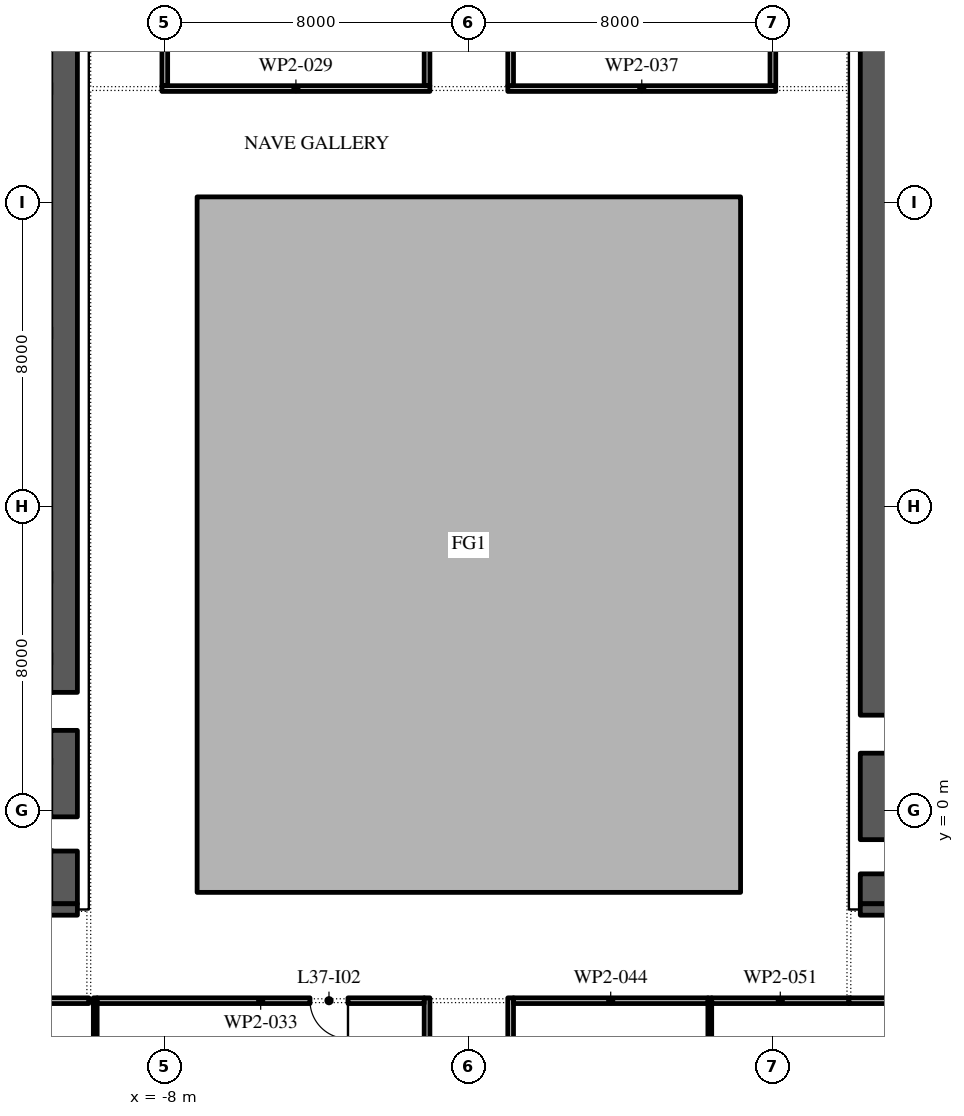
"""IFC4 building model, lengths in metres.
Left out: names, types, materials, properties, quantities, classifications, styles, units other than length and angle.
Written with IfcOpenShell. Run it as: python <this file> out.ifc"""

import sys

from ifc_helpers import new_model, si_unit, direction, frame, frame_2d, origin, place, context, subcontext, project, spatial, polyline, rectangle, outline, extrude, element, fill, save


model = new_model("IFC4")
c1 = context("Model", 3, precision=1e-05, world=origin(), true_north=direction((0.0, 1.0)))
c2 = subcontext(c1, "Body", "Model", "MODEL_VIEW")
j1 = project(units=[si_unit("LENGTHUNIT", "METRE"), si_unit("PLANEANGLEUNIT", "RADIAN")], contexts=[c1])
p1 = place(None, origin())
s1 = spatial("IfcSite", under=j1, at=p1, CompositionType="ELEMENT")
p2 = place(p1, origin())
s2 = spatial("IfcBuilding", under=s1, at=p2, CompositionType="ELEMENT")
p3 = place(p2, frame((0.0, 0.0, 171.6)))
s3 = spatial("IfcBuildingStorey", under=s2, at=p3, CompositionType="ELEMENT", Elevation=171.6)
p4 = place(p3, origin())
e1 = element("IfcWall", 1, at=p4, inside=s3, PredefinedType="STANDARD", context=c2, shape_type="SweptSolid", body=[
    extrude(outline(polyline([(-7.15, -2.15), (7.15, -2.15), (7.15, 16.15), (-7.15, 16.15), (-7.15, -2.15)]), holes=[polyline([(-7.0, -2.0), (-7.0, 16.0), (7.0, 16.0), (7.0, -2.0), (-7.0, -2.0)])]), origin(), (0.0, 0.0, 1.0), 4.0),
])
p5 = place(p3, frame((-10.65, -2.45, 0.0), z_axis=(0.0, 0.0, 1.0), x_axis=(0.0, 1.0, 0.0)))
e2 = element("IfcWall", 2, at=p5, inside=s3, PredefinedType="SHEAR", context=c2, shape_type="SweptSolid", body=[
    extrude(rectangle(XDim=27.9, YDim=0.7, at=frame_2d((13.95, 0.0))), origin(), (0.0, 0.0, 1.0), 4.0),
])
p6 = place(p5, frame((23.65, 0.0, 0.0)))
e3 = element("IfcOpeningElement", 3, at=p6, cuts=e2, PredefinedType="OPENING", context=c2, shape_type="SweptSolid", body=[
    extrude(rectangle(XDim=2.4, YDim=2.1, at=frame_2d((1.2, 1.05))), frame((0.0, 0.36, 0.0), z_axis=(0.0, -1.0, 0.0), x_axis=(1.0, 0.0, 0.0)), (0.0, 0.0, 1.0), 0.72),
])
p7 = place(p5, frame((1.387, 0.0, 0.0)))
e4 = element("IfcOpeningElement", 4, at=p7, cuts=e2, PredefinedType="OPENING", context=c2, shape_type="SweptSolid", body=[
    extrude(rectangle(XDim=0.9, YDim=2.1, at=frame_2d((0.45, 1.05))), frame((0.0, 0.36, 0.0), z_axis=(0.0, -1.0, 0.0), x_axis=(1.0, 0.0, 0.0)), (0.0, 0.0, 1.0), 0.72),
])
p8 = place(p5, frame((4.562, 0.0, 0.0)))
e5 = element("IfcOpeningElement", 5, at=p8, cuts=e2, PredefinedType="OPENING", context=c2, shape_type="SweptSolid", body=[
    extrude(rectangle(XDim=1.0, YDim=2.1, at=frame_2d((0.5, 1.05))), frame((0.0, 0.36, 0.0), z_axis=(0.0, -1.0, 0.0), x_axis=(1.0, 0.0, 0.0)), (0.0, 0.0, 1.0), 0.72),
])
p9 = place(p3, frame((-21.7, -2.6, 0.0), z_axis=(0.0, 0.0, 1.0), x_axis=(1.0, 0.0, 0.0)))
e6 = element("IfcWall", 6, at=p9, inside=s3, PredefinedType="SHEAR", context=c2, shape_type="SweptSolid", body=[
    extrude(rectangle(XDim=11.4, YDim=0.3, at=frame_2d((5.7, 0.0))), origin(), (0.0, 0.0, 1.0), 4.0),
])
p10 = place(p3, frame((10.65, -2.45, 0.0), z_axis=(0.0, 0.0, 1.0), x_axis=(0.0, 1.0, 0.0)))
e7 = element("IfcWall", 7, at=p10, inside=s3, PredefinedType="SHEAR", context=c2, shape_type="SweptSolid", body=[
    extrude(rectangle(XDim=27.9, YDim=0.7, at=frame_2d((13.95, 0.0))), origin(), (0.0, 0.0, 1.0), 4.0),
])
p11 = place(p10, frame((23.65, 0.0, 0.0)))
e8 = element("IfcOpeningElement", 8, at=p11, cuts=e7, PredefinedType="OPENING", context=c2, shape_type="SweptSolid", body=[
    extrude(rectangle(XDim=2.4, YDim=2.1, at=frame_2d((1.2, 1.05))), frame((0.0, 0.36, 0.0), z_axis=(0.0, -1.0, 0.0), x_axis=(1.0, 0.0, 0.0)), (0.0, 0.0, 1.0), 0.72),
])
p12 = place(p10, frame((0.788, 0.0, 0.0)))
e9 = element("IfcOpeningElement", 9, at=p12, cuts=e7, PredefinedType="OPENING", context=c2, shape_type="SweptSolid", body=[
    extrude(rectangle(XDim=0.9, YDim=2.1, at=frame_2d((0.45, 1.05))), frame((0.0, 0.36, 0.0), z_axis=(0.0, -1.0, 0.0), x_axis=(1.0, 0.0, 0.0)), (0.0, 0.0, 1.0), 0.72),
])
p13 = place(p10, frame((3.962, 0.0, 0.0)))
e10 = element("IfcOpeningElement", 10, at=p13, cuts=e7, PredefinedType="OPENING", context=c2, shape_type="SweptSolid", body=[
    extrude(rectangle(XDim=1.0, YDim=2.1, at=frame_2d((0.5, 1.05))), frame((0.0, 0.36, 0.0), z_axis=(0.0, -1.0, 0.0), x_axis=(1.0, 0.0, 0.0)), (0.0, 0.0, 1.0), 0.72),
])
p14 = place(p3, frame((10.3, -2.6, 0.0), z_axis=(0.0, 0.0, 1.0), x_axis=(1.0, 0.0, 0.0)))
e11 = element("IfcWall", 11, at=p14, inside=s3, PredefinedType="SHEAR", context=c2, shape_type="SweptSolid", body=[
    extrude(rectangle(XDim=11.4, YDim=0.3, at=frame_2d((5.7, 0.0))), origin(), (0.0, 0.0, 1.0), 4.0),
])
p15 = place(p3, frame((-10.0, -5.0, 0.0), z_axis=(0.0, 0.0, 1.0), x_axis=(-1.0, 0.0, 0.0)))
e12 = element("IfcWall", 12, at=p15, inside=s3, PredefinedType="PARTITIONING", context=c2, shape_type="SweptSolid", body=[
    extrude(rectangle(XDim=13.925, YDim=0.15, at=frame_2d((6.962, 0.0))), origin(), (0.0, 0.0, 1.0), 4.0),
])
p16 = place(p15, frame((7.85, 0.0, 0.0)))
e13 = element("IfcOpeningElement", 13, at=p16, cuts=e12, PredefinedType="OPENING", context=c2, shape_type="SweptSolid", body=[
    extrude(rectangle(XDim=1.0, YDim=2.1, at=frame_2d((0.5, 1.05))), frame((0.0, 0.085, 0.0), z_axis=(0.0, -1.0, 0.0), x_axis=(1.0, 0.0, 0.0)), (0.0, 0.0, 1.0), 0.17),
])
p17 = place(p3, frame((-9.83, -11.12, 0.0), z_axis=(0.0, 0.0, 1.0), x_axis=(0.0, 1.0, 0.0)))
e14 = element("IfcWall", 14, at=p17, inside=s3, PredefinedType="PARTITIONING", context=c2, shape_type="SweptSolid", body=[
    extrude(rectangle(XDim=6.195, YDim=0.1, at=frame_2d((3.098, 0.0))), origin(), (0.0, 0.0, 1.0), 4.0),
])
p18 = place(p3, frame((-8.075, 19.0, 0.0), z_axis=(0.0, 0.0, 1.0), x_axis=(1.0, 0.0, 0.0)))
e15 = element("IfcWall", 15, at=p18, inside=s3, PredefinedType="PARTITIONING", context=c2, shape_type="SweptSolid", body=[
    extrude(rectangle(XDim=7.05, YDim=0.15, at=frame_2d((3.525, 0.0))), origin(), (0.0, 0.0, 1.0), 4.0),
])
p19 = place(p3, frame((-8.0, 27.325, 0.0), z_axis=(0.0, 0.0, 1.0), x_axis=(0.0, -1.0, 0.0)))
e16 = element("IfcWall", 16, at=p19, inside=s3, PredefinedType="PARTITIONING", context=c2, shape_type="SweptSolid", body=[
    extrude(rectangle(XDim=8.25, YDim=0.15, at=frame_2d((4.125, 0.0))), origin(), (0.0, 0.0, 1.0), 4.0),
])
p20 = place(p3, frame((-1.1, -11.12, 0.0), z_axis=(0.0, 0.0, 1.0), x_axis=(0.0, 1.0, 0.0)))
e17 = element("IfcWall", 17, at=p20, inside=s3, PredefinedType="PARTITIONING", context=c2, shape_type="SweptSolid", body=[
    extrude(rectangle(XDim=6.195, YDim=0.15, at=frame_2d((3.098, 0.0))), origin(), (0.0, 0.0, 1.0), 4.0),
])
p21 = place(p3, frame((-1.175, -5.0, 0.0), z_axis=(0.0, 0.0, 1.0), x_axis=(-1.0, 0.0, 0.0)))
e18 = element("IfcWall", 18, at=p21, inside=s3, PredefinedType="PARTITIONING", context=c2, shape_type="SweptSolid", body=[
    extrude(rectangle(XDim=8.605, YDim=0.15, at=frame_2d((4.302, 0.0))), origin(), (0.0, 0.0, 1.0), 4.0),
])
p22 = place(p21, frame((2.005, 0.0, 0.0)))
e19 = element("IfcOpeningElement", 19, at=p22, cuts=e18, PredefinedType="OPENING", context=c2, shape_type="SweptSolid", body=[
    extrude(rectangle(XDim=1.0, YDim=2.1, at=frame_2d((0.5, 1.05))), frame((0.0, 0.085, 0.0), z_axis=(0.0, -1.0, 0.0), x_axis=(1.0, 0.0, 0.0)), (0.0, 0.0, 1.0), 0.17),
])
p23 = place(p3, frame((-1.1, 19.075, 0.0), z_axis=(0.0, 0.0, 1.0), x_axis=(0.0, 1.0, 0.0)))
e20 = element("IfcWall", 20, at=p23, inside=s3, PredefinedType="PARTITIONING", context=c2, shape_type="SweptSolid", body=[
    extrude(rectangle(XDim=11.295, YDim=0.15, at=frame_2d((5.647, 0.0))), origin(), (0.0, 0.0, 1.0), 4.0),
])
p24 = place(p23, frame((6.195, 0.0, 0.0)))
e21 = element("IfcOpeningElement", 21, at=p24, cuts=e20, PredefinedType="OPENING", context=c2, shape_type="SweptSolid", body=[
    extrude(rectangle(XDim=1.0, YDim=2.1, at=frame_2d((0.5, 1.05))), frame((0.0, 0.085, 0.0), z_axis=(0.0, -1.0, 0.0), x_axis=(1.0, 0.0, 0.0)), (0.0, 0.0, 1.0), 0.17),
])
p25 = place(p3, frame((1.1, -4.925, 0.0), z_axis=(0.0, 0.0, 1.0), x_axis=(0.0, -1.0, 0.0)))
e22 = element("IfcWall", 22, at=p25, inside=s3, PredefinedType="PARTITIONING", context=c2, shape_type="SweptSolid", body=[
    extrude(rectangle(XDim=11.345, YDim=0.15, at=frame_2d((5.672, 0.0))), origin(), (0.0, 0.0, 1.0), 4.0),
])
p26 = place(p25, frame((7.675, 0.0, 0.0)))
e23 = element("IfcOpeningElement", 23, at=p26, cuts=e22, PredefinedType="OPENING", context=c2, shape_type="SweptSolid", body=[
    extrude(rectangle(XDim=1.0, YDim=2.1, at=frame_2d((0.5, 1.05))), frame((0.0, 0.085, 0.0), z_axis=(0.0, -1.0, 0.0), x_axis=(1.0, 0.0, 0.0)), (0.0, 0.0, 1.0), 0.17),
])
p27 = place(p3, frame((1.025, 19.0, 0.0), z_axis=(0.0, 0.0, 1.0), x_axis=(1.0, 0.0, 0.0)))
e24 = element("IfcWall", 24, at=p27, inside=s3, PredefinedType="PARTITIONING", context=c2, shape_type="SweptSolid", body=[
    extrude(rectangle(XDim=7.05, YDim=0.15, at=frame_2d((3.525, 0.0))), origin(), (0.0, 0.0, 1.0), 4.0),
])
p28 = place(p3, frame((1.1, 30.47, 0.0), z_axis=(0.0, 0.0, 1.0), x_axis=(0.0, -1.0, 0.0)))
e25 = element("IfcWall", 25, at=p28, inside=s3, PredefinedType="PARTITIONING", context=c2, shape_type="SweptSolid", body=[
    extrude(rectangle(XDim=11.395, YDim=0.15, at=frame_2d((5.698, 0.0))), origin(), (0.0, 0.0, 1.0), 4.0),
])
p29 = place(p28, frame((4.07, 0.0, 0.0)))
e26 = element("IfcOpeningElement", 26, at=p29, cuts=e25, PredefinedType="OPENING", context=c2, shape_type="SweptSolid", body=[
    extrude(rectangle(XDim=1.0, YDim=2.1, at=frame_2d((0.5, 1.05))), frame((0.0, 0.085, 0.0), z_axis=(0.0, -1.0, 0.0), x_axis=(1.0, 0.0, 0.0)), (0.0, 0.0, 1.0), 0.17),
])
p30 = place(p3, frame((6.34, -15.061, 0.0), z_axis=(0.0, 0.0, 1.0), x_axis=(0.0, 1.0, 0.0)))
e27 = element("IfcWall", 27, at=p30, inside=s3, PredefinedType="PARTITIONING", context=c2, shape_type="SweptSolid", body=[
    extrude(rectangle(XDim=10.136, YDim=0.1, at=frame_2d((5.068, 0.0))), origin(), (0.0, 0.0, 1.0), 4.0),
])
p31 = place(p3, frame((6.29, -5.0, 0.0), z_axis=(0.0, 0.0, 1.0), x_axis=(-1.0, 0.0, 0.0)))
e28 = element("IfcWall", 28, at=p31, inside=s3, PredefinedType="PARTITIONING", context=c2, shape_type="SweptSolid", body=[
    extrude(rectangle(XDim=5.115, YDim=0.15, at=frame_2d((2.558, 0.0))), origin(), (0.0, 0.0, 1.0), 4.0),
])
p32 = place(p3, frame((8.0, 19.075, 0.0), z_axis=(0.0, 0.0, 1.0), x_axis=(0.0, 1.0, 0.0)))
e29 = element("IfcWall", 29, at=p32, inside=s3, PredefinedType="PARTITIONING", context=c2, shape_type="SweptSolid", body=[
    extrude(rectangle(XDim=8.4, YDim=0.15, at=frame_2d((4.2, 0.0))), origin(), (0.0, 0.0, 1.0), 4.0),
])
p33 = place(p3, frame((10.0, -5.0, 0.0), z_axis=(0.0, 0.0, 1.0), x_axis=(-1.0, 0.0, 0.0)))
e30 = element("IfcWall", 30, at=p33, inside=s3, PredefinedType="PARTITIONING", context=c2, shape_type="SweptSolid", body=[
    extrude(rectangle(XDim=3.61, YDim=0.15, at=frame_2d((1.805, 0.0))), origin(), (0.0, 0.0, 1.0), 4.0),
])
p34 = place(p3, frame((14.38, -5.0, 0.0), z_axis=(0.0, 0.0, 1.0), x_axis=(-1.0, 0.0, 0.0)))
e31 = element("IfcWall", 31, at=p34, inside=s3, PredefinedType="PARTITIONING", context=c2, shape_type="SweptSolid", body=[
    extrude(rectangle(XDim=4.38, YDim=0.15, at=frame_2d((2.19, 0.0))), origin(), (0.0, 0.0, 1.0), 4.0),
])
p35 = place(p34, frame((1.73, 0.0, 0.0)))
e32 = element("IfcOpeningElement", 32, at=p35, cuts=e31, PredefinedType="OPENING", context=c2, shape_type="SweptSolid", body=[
    extrude(rectangle(XDim=1.0, YDim=2.1, at=frame_2d((0.5, 1.05))), frame((0.0, 0.085, 0.0), z_axis=(0.0, -1.0, 0.0), x_axis=(1.0, 0.0, 0.0)), (0.0, 0.0, 1.0), 0.17),
])
p36 = place(p22, origin())
e33 = element("IfcDoor", 33, at=p36, inside=s3, OperationType="SINGLE_SWING_RIGHT", PredefinedType="DOOR", context=c2, shape_type="SweptSolid", body=[
    extrude(rectangle(XDim=1.0, YDim=2.1, at=frame_2d((0.5, 1.05))), frame((0.0, 0.025, 0.0), z_axis=(0.0, -1.0, 0.0), x_axis=(1.0, 0.0, 0.0)), (0.0, 0.0, 1.0), 0.05),
])
fill(e19, e33)
save(model, sys.argv[1])
